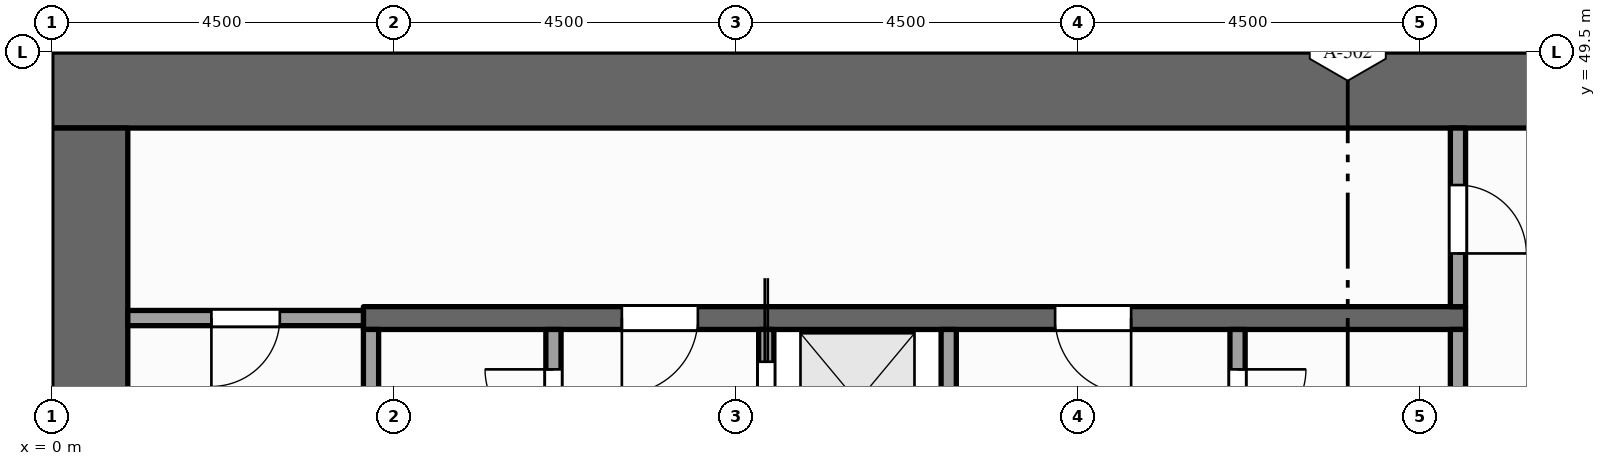
"""IFC4 building model, lengths in metres.
Left out: names, types, materials, properties, quantities, classifications, styles, units other than length and angle.
Written with IfcOpenShell. Run it as: python <this file> out.ifc"""

import sys

from ifc_helpers import new_model, si_unit, direction, frame, frame_2d, origin, place, context, subcontext, project, spatial, rectangle, extrude, element, fill, save


model = new_model("IFC4")
c1 = context("Model", 3, precision=1e-05, world=origin(), true_north=direction((0.0, 1.0)))
c2 = subcontext(c1, "Body", "Model", "MODEL_VIEW")
j1 = project(units=[si_unit("LENGTHUNIT", "METRE"), si_unit("PLANEANGLEUNIT", "RADIAN")], contexts=[c1])
p1 = place(None, origin())
s1 = spatial("IfcSite", under=j1, at=p1, CompositionType="ELEMENT")
p2 = place(p1, origin())
s2 = spatial("IfcBuilding", under=s1, at=p2, CompositionType="ELEMENT")
p3 = place(p2, frame((0.0, 0.0, 215.0)))
s3 = spatial("IfcBuildingStorey", under=s2, at=p3, CompositionType="ELEMENT", Elevation=215.0)
p4 = place(p3, frame((0.0, 49.0, -0.15), z_axis=(0.0, 0.0, 1.0), x_axis=(1.0, 0.0, 0.0)))
e1 = element("IfcWall", 1, at=p4, inside=s3, PredefinedType="SHEAR", context=c2, shape_type="SweptSolid", body=[
    extrude(rectangle(XDim=22.5, YDim=1.0, at=frame_2d((11.25, 0.0))), origin(), (0.0, 0.0, 1.0), 4.0),
])
p5 = place(p3, frame((0.5, 37.0, -0.15), z_axis=(0.0, 0.0, 1.0), x_axis=(0.0, 1.0, 0.0)))
e2 = element("IfcWall", 2, at=p5, inside=s3, PredefinedType="SHEAR", context=c2, shape_type="SweptSolid", body=[
    extrude(rectangle(XDim=11.5, YDim=1.0, at=frame_2d((5.75, 0.0))), origin(), (0.0, 0.0, 1.0), 4.0),
])
p6 = place(p3, frame((4.2, 43.525, 0.0), z_axis=(0.0, 0.0, 1.0), x_axis=(0.0, 1.0, 0.0)))
e3 = element("IfcWall", 3, at=p6, inside=s3, PredefinedType="PARTITIONING", context=c2, shape_type="SweptSolid", body=[
    extrude(rectangle(XDim=2.325, YDim=0.2, at=frame_2d((1.163, 0.0))), origin(), (0.0, 0.0, 1.0), 3.85),
])
p7 = place(p3, frame((6.6, 37.0, 0.0), z_axis=(0.0, 0.0, 1.0), x_axis=(0.0, 1.0, 0.0)))
e4 = element("IfcWall", 4, at=p7, inside=s3, PredefinedType="PARTITIONING", context=c2, shape_type="SweptSolid", body=[
    extrude(rectangle(XDim=8.85, YDim=0.2, at=frame_2d((4.425, 0.0))), origin(), (0.0, 0.0, 1.0), 3.85),
])
p8 = place(p7, frame((0.7, 0.0, 0.0)))
e5 = element("IfcOpeningElement", 5, at=p8, cuts=e4, PredefinedType="OPENING", context=c2, shape_type="SweptSolid", body=[
    extrude(rectangle(XDim=0.9, YDim=2.1, at=frame_2d((0.45, 1.05))), frame((0.0, 0.11, 0.0), z_axis=(0.0, -1.0, 0.0), x_axis=(1.0, 0.0, 0.0)), (0.0, 0.0, 1.0), 0.22),
])
p9 = place(p7, frame((4.15, 0.0, 0.0)))
e6 = element("IfcOpeningElement", 6, at=p9, cuts=e4, PredefinedType="OPENING", context=c2, shape_type="SweptSolid", body=[
    extrude(rectangle(XDim=0.9, YDim=2.1, at=frame_2d((0.45, 1.05))), frame((0.0, 0.11, 0.0), z_axis=(0.0, -1.0, 0.0), x_axis=(1.0, 0.0, 0.0)), (0.0, 0.0, 1.0), 0.22),
])
p10 = place(p7, frame((7.425, 0.0, 0.0)))
e7 = element("IfcOpeningElement", 7, at=p10, cuts=e4, PredefinedType="OPENING", context=c2, shape_type="SweptSolid", body=[
    extrude(rectangle(XDim=0.9, YDim=2.1, at=frame_2d((0.45, 1.05))), frame((0.0, 0.11, 0.0), z_axis=(0.0, -1.0, 0.0), x_axis=(1.0, 0.0, 0.0)), (0.0, 0.0, 1.0), 0.22),
])
p11 = place(p3, frame((9.4, 37.0, 0.0), z_axis=(0.0, 0.0, 1.0), x_axis=(0.0, 1.0, 0.0)))
e8 = element("IfcWall", 8, at=p11, inside=s3, PredefinedType="SOLIDWALL", context=c2, shape_type="SweptSolid", body=[
    extrude(rectangle(XDim=8.85, YDim=0.2, at=frame_2d((4.425, 0.0))), origin(), (0.0, 0.0, 1.0), 3.85),
])
p12 = place(p11, frame((0.6, 0.0, 0.012)))
e9 = element("IfcOpeningElement", 9, at=p12, cuts=e8, PredefinedType="OPENING", context=c2, shape_type="SweptSolid", body=[
    extrude(rectangle(XDim=1.1, YDim=2.1, at=frame_2d((0.55, 1.05))), frame((0.0, 0.11, 0.0), z_axis=(0.0, -1.0, 0.0), x_axis=(1.0, 0.0, 0.0)), (0.0, 0.0, 1.0), 0.22),
])
p13 = place(p11, frame((2.95, 0.0, 0.012)))
e10 = element("IfcOpeningElement", 10, at=p13, cuts=e8, PredefinedType="OPENING", context=c2, shape_type="SweptSolid", body=[
    extrude(rectangle(XDim=1.1, YDim=2.1, at=frame_2d((0.55, 1.05))), frame((0.0, 0.11, 0.0), z_axis=(0.0, -1.0, 0.0), x_axis=(1.0, 0.0, 0.0)), (0.0, 0.0, 1.0), 0.22),
])
p14 = place(p11, frame((5.15, 0.0, 0.012)))
e11 = element("IfcOpeningElement", 11, at=p14, cuts=e8, PredefinedType="OPENING", context=c2, shape_type="SweptSolid", body=[
    extrude(rectangle(XDim=1.1, YDim=2.1, at=frame_2d((0.55, 1.05))), frame((0.0, 0.11, 0.0), z_axis=(0.0, -1.0, 0.0), x_axis=(1.0, 0.0, 0.0)), (0.0, 0.0, 1.0), 0.22),
])
p15 = place(p11, frame((7.325, 0.0, 0.012)))
e12 = element("IfcOpeningElement", 12, at=p15, cuts=e8, PredefinedType="OPENING", context=c2, shape_type="SweptSolid", body=[
    extrude(rectangle(XDim=1.1, YDim=2.1, at=frame_2d((0.55, 1.05))), frame((0.0, 0.11, 0.0), z_axis=(0.0, -1.0, 0.0), x_axis=(1.0, 0.0, 0.0)), (0.0, 0.0, 1.0), 0.22),
])
p16 = place(p3, frame((11.8, 37.0, 0.0), z_axis=(0.0, 0.0, 1.0), x_axis=(0.0, 1.0, 0.0)))
e13 = element("IfcWall", 13, at=p16, inside=s3, PredefinedType="SOLIDWALL", context=c2, shape_type="SweptSolid", body=[
    extrude(rectangle(XDim=8.85, YDim=0.2, at=frame_2d((4.425, 0.0))), origin(), (0.0, 0.0, 1.0), 3.85),
])
p17 = place(p3, frame((15.6, 43.9, 0.0), z_axis=(0.0, 0.0, 1.0), x_axis=(0.0, 1.0, 0.0)))
e14 = element("IfcWall", 14, at=p17, inside=s3, PredefinedType="PARTITIONING", context=c2, shape_type="SweptSolid", body=[
    extrude(rectangle(XDim=1.95, YDim=0.2, at=frame_2d((0.975, 0.0))), origin(), (0.0, 0.0, 1.0), 3.85),
])
p18 = place(p17, frame((0.525, 0.0, 0.0)))
e15 = element("IfcOpeningElement", 15, at=p18, cuts=e14, PredefinedType="OPENING", context=c2, shape_type="SweptSolid", body=[
    extrude(rectangle(XDim=0.9, YDim=2.1, at=frame_2d((0.45, 1.05))), frame((0.0, 0.11, 0.0), z_axis=(0.0, -1.0, 0.0), x_axis=(1.0, 0.0, 0.0)), (0.0, 0.0, 1.0), 0.22),
])
p19 = place(p3, frame((18.5, 43.9, 0.0), z_axis=(0.0, 0.0, 1.0), x_axis=(0.0, 1.0, 0.0)))
e16 = element("IfcWall", 16, at=p19, inside=s3, PredefinedType="PARTITIONING", context=c2, shape_type="SweptSolid", body=[
    extrude(rectangle(XDim=1.95, YDim=0.2, at=frame_2d((0.975, 0.0))), origin(), (0.0, 0.0, 1.0), 3.85),
])
p20 = place(p3, frame((18.5, 46.15, 0.0), z_axis=(0.0, 0.0, 1.0), x_axis=(0.0, 1.0, 0.0)))
e17 = element("IfcWall", 17, at=p20, inside=s3, PredefinedType="PARTITIONING", context=c2, shape_type="SweptSolid", body=[
    extrude(rectangle(XDim=2.35, YDim=0.2, at=frame_2d((1.175, 0.0))), origin(), (0.0, 0.0, 1.0), 3.85),
])
p21 = place(p20, frame((0.7, 0.0, 0.0)))
e18 = element("IfcOpeningElement", 18, at=p21, cuts=e17, PredefinedType="OPENING", context=c2, shape_type="SweptSolid", body=[
    extrude(rectangle(XDim=0.9, YDim=2.1, at=frame_2d((0.45, 1.05))), frame((0.0, 0.11, 0.0), z_axis=(0.0, -1.0, 0.0), x_axis=(1.0, 0.0, 0.0)), (0.0, 0.0, 1.0), 0.22),
])
p22 = place(p3, frame((1.0, 46.0, 0.0), z_axis=(0.0, 0.0, 1.0), x_axis=(1.0, 0.0, 0.0)))
e19 = element("IfcWall", 19, at=p22, inside=s3, PredefinedType="PARTITIONING", context=c2, shape_type="SweptSolid", body=[
    extrude(rectangle(XDim=3.1, YDim=0.2, at=frame_2d((1.55, 0.0))), origin(), (0.0, 0.0, 1.0), 3.85),
])
p23 = place(p22, frame((1.1, 0.0, 0.0)))
e20 = element("IfcOpeningElement", 20, at=p23, cuts=e19, PredefinedType="OPENING", context=c2, shape_type="SweptSolid", body=[
    extrude(rectangle(XDim=0.9, YDim=2.1, at=frame_2d((0.45, 1.05))), frame((0.0, 0.11, 0.0), z_axis=(0.0, -1.0, 0.0), x_axis=(1.0, 0.0, 0.0)), (0.0, 0.0, 1.0), 0.22),
])
p24 = place(p3, frame((4.1, 46.0, 0.0), z_axis=(0.0, 0.0, 1.0), x_axis=(1.0, 0.0, 0.0)))
e21 = element("IfcWall", 21, at=p24, inside=s3, PredefinedType="SHEAR", context=c2, shape_type="SweptSolid", body=[
    extrude(rectangle(XDim=14.5, YDim=0.3, at=frame_2d((7.25, 0.0))), origin(), (0.0, 0.0, 1.0), 3.85),
])
p25 = place(p24, frame((3.4, 0.0, 0.0)))
e22 = element("IfcOpeningElement", 22, at=p25, cuts=e21, PredefinedType="OPENING", context=c2, shape_type="SweptSolid", body=[
    extrude(rectangle(XDim=1.0, YDim=2.1, at=frame_2d((0.5, 1.05))), frame((0.0, 0.16, 0.0), z_axis=(0.0, -1.0, 0.0), x_axis=(1.0, 0.0, 0.0)), (0.0, 0.0, 1.0), 0.32),
])
p26 = place(p24, frame((9.1, 0.0, 0.0)))
e23 = element("IfcOpeningElement", 23, at=p26, cuts=e21, PredefinedType="OPENING", context=c2, shape_type="SweptSolid", body=[
    extrude(rectangle(XDim=1.0, YDim=2.1, at=frame_2d((0.5, 1.05))), frame((0.0, 0.16, 0.0), z_axis=(0.0, -1.0, 0.0), x_axis=(1.0, 0.0, 0.0)), (0.0, 0.0, 1.0), 0.32),
])
p27 = place(p15, origin())
e24 = element("IfcDoor", 24, at=p27, inside=s3, OperationType="SLIDING_TO_RIGHT", PredefinedType="DOOR", context=c2, shape_type="SweptSolid", body=[
    extrude(rectangle(XDim=1.1, YDim=2.1, at=frame_2d((0.55, 1.05))), frame((0.0, 0.025, 0.0), z_axis=(0.0, -1.0, 0.0), x_axis=(1.0, 0.0, 0.0)), (0.0, 0.0, 1.0), 0.05),
])
fill(e12, e24)
p28 = place(p25, origin())
e25 = element("IfcDoor", 25, at=p28, inside=s3, OperationType="SINGLE_SWING_LEFT", PredefinedType="DOOR", context=c2, shape_type="SweptSolid", body=[
    extrude(rectangle(XDim=1.0, YDim=2.1, at=frame_2d((0.5, 1.05))), frame((0.0, 0.025, 0.0), z_axis=(0.0, -1.0, 0.0), x_axis=(1.0, 0.0, 0.0)), (0.0, 0.0, 1.0), 0.05),
])
fill(e22, e25)
p29 = place(p26, origin())
e26 = element("IfcDoor", 26, at=p29, inside=s3, OperationType="SINGLE_SWING_RIGHT", PredefinedType="DOOR", context=c2, shape_type="SweptSolid", body=[
    extrude(rectangle(XDim=1.0, YDim=2.1, at=frame_2d((0.5, 1.05))), frame((0.0, 0.025, 0.0), z_axis=(0.0, -1.0, 0.0), x_axis=(1.0, 0.0, 0.0)), (0.0, 0.0, 1.0), 0.05),
])
fill(e23, e26)
p30 = place(p23, origin())
e27 = element("IfcDoor", 27, at=p30, inside=s3, OperationType="SINGLE_SWING_LEFT", PredefinedType="DOOR", context=c2, shape_type="SweptSolid", body=[
    extrude(rectangle(XDim=0.9, YDim=2.1, at=frame_2d((0.45, 1.05))), frame((0.0, 0.025, 0.0), z_axis=(0.0, -1.0, 0.0), x_axis=(1.0, 0.0, 0.0)), (0.0, 0.0, 1.0), 0.05),
])
fill(e20, e27)
p31 = place(p21, origin())
e28 = element("IfcDoor", 28, at=p31, inside=s3, OperationType="SINGLE_SWING_LEFT", PredefinedType="DOOR", context=c2, shape_type="SweptSolid", body=[
    extrude(rectangle(XDim=0.9, YDim=2.1, at=frame_2d((0.45, 1.05))), frame((0.0, 0.025, 0.0), z_axis=(0.0, -1.0, 0.0), x_axis=(1.0, 0.0, 0.0)), (0.0, 0.0, 1.0), 0.05),
])
fill(e18, e28)
p32 = place(p10, origin())
e29 = element("IfcDoor", 29, at=p32, inside=s3, OperationType="SINGLE_SWING_RIGHT", PredefinedType="DOOR", context=c2, shape_type="SweptSolid", body=[
    extrude(rectangle(XDim=0.9, YDim=2.1, at=frame_2d((0.45, 1.05))), frame((0.0, 0.025, 0.0), z_axis=(0.0, -1.0, 0.0), x_axis=(1.0, 0.0, 0.0)), (0.0, 0.0, 1.0), 0.05),
])
fill(e7, e29)
p33 = place(p18, origin())
e30 = element("IfcDoor", 30, at=p33, inside=s3, OperationType="SINGLE_SWING_RIGHT", PredefinedType="DOOR", context=c2, shape_type="SweptSolid", body=[
    extrude(rectangle(XDim=0.9, YDim=2.1, at=frame_2d((0.45, 1.05))), frame((0.0, 0.025, 0.0), z_axis=(0.0, -1.0, 0.0), x_axis=(1.0, 0.0, 0.0)), (0.0, 0.0, 1.0), 0.05),
])
fill(e15, e30)
save(model, sys.argv[1])
